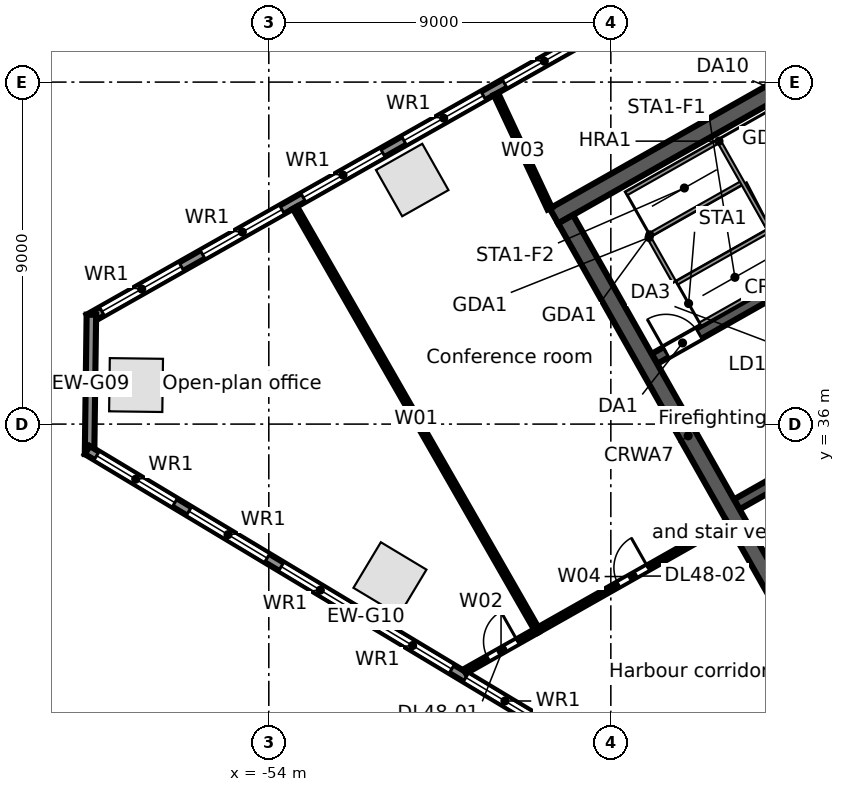
"""IFC4 building model, lengths in metres.
Left out: names, types, materials, properties, quantities, classifications, styles, units other than length and angle.
Written with IfcOpenShell. Run it as: python <this file> out.ifc"""

import sys

from ifc_helpers import new_model, si_unit, direction, frame, frame_2d, origin, origin_2d, place, context, subcontext, project, spatial, rectangle, extrude, element, fill, save


model = new_model("IFC4")
c1 = context("Model", 3, precision=1e-05, world=origin(), true_north=direction((0.0, 1.0)))
c2 = subcontext(c1, "Body", "Model", "MODEL_VIEW")
j1 = project(units=[si_unit("LENGTHUNIT", "METRE"), si_unit("PLANEANGLEUNIT", "RADIAN")], contexts=[c1])
p1 = place(None, origin())
s1 = spatial("IfcSite", under=j1, at=p1, CompositionType="ELEMENT")
p2 = place(p1, origin())
s2 = spatial("IfcBuilding", under=s1, at=p2, CompositionType="ELEMENT")
p3 = place(p2, frame((0.0, 0.0, 223.1)))
s3 = spatial("IfcBuildingStorey", under=s2, at=p3, CompositionType="ELEMENT", Elevation=223.1)
for number, where, z_axis, x_axis in (
    (1, (-50.226, 42.423, 0.0), (0.0, 0.0, 1.0), (-0.87, -0.492, 0.0)),
    (2, (-57.493, 37.027, 0.0), (0.0, 0.0, 1.0), (-0.013, -1.0, 0.0)),
    (3, (-50.812, 31.931, 0.0), (0.0, 0.0, 1.0), (0.857, -0.515, 0.0)),
):
    element("IfcColumn", number, at=place(p3, frame(where, z_axis=z_axis, x_axis=x_axis)), inside=s3, PredefinedType="COLUMN", context=c2, shape_type="SweptSolid", body=[
        extrude(rectangle(XDim=1.4, YDim=1.4, at=origin_2d()), origin(), (0.0, 0.0, 1.0), 3.9),
    ])
p4 = place(p3, frame((-58.732, 38.771, 0.0), z_axis=(0.0, 0.0, 1.0), x_axis=(0.870354824205, 0.492425100887, 0.0)))
e4 = element("IfcWall", 4, at=p4, inside=s3, PredefinedType="STANDARD", context=c2, shape_type="SweptSolid", body=[
    extrude(rectangle(XDim=64.006, YDim=0.25, at=frame_2d((32.003, 0.0))), origin(), (0.0, 0.0, 1.0), 3.62),
])
p5 = place(p4, frame((61.259, 0.0, 0.8)))
e5 = element("IfcOpeningElement", 5, at=p5, cuts=e4, PredefinedType="OPENING", context=c2, shape_type="SweptSolid", body=[
    extrude(rectangle(XDim=2.4, YDim=2.2, at=frame_2d((1.2, 1.1))), frame((0.0, 0.135, 0.0), z_axis=(0.0, -1.0, 0.0), x_axis=(1.0, 0.0, 0.0)), (0.0, 0.0, 1.0), 0.27),
])
p6 = place(p4, frame((58.216, 0.0, 0.8)))
e6 = element("IfcOpeningElement", 6, at=p6, cuts=e4, PredefinedType="OPENING", context=c2, shape_type="SweptSolid", body=[
    extrude(rectangle(XDim=2.4, YDim=2.2, at=frame_2d((1.2, 1.1))), frame((0.0, 0.135, 0.0), z_axis=(0.0, -1.0, 0.0), x_axis=(1.0, 0.0, 0.0)), (0.0, 0.0, 1.0), 0.27),
])
p7 = place(p4, frame((55.173, 0.0, 0.8)))
e7 = element("IfcOpeningElement", 7, at=p7, cuts=e4, PredefinedType="OPENING", context=c2, shape_type="SweptSolid", body=[
    extrude(rectangle(XDim=2.4, YDim=2.2, at=frame_2d((1.2, 1.1))), frame((0.0, 0.135, 0.0), z_axis=(0.0, -1.0, 0.0), x_axis=(1.0, 0.0, 0.0)), (0.0, 0.0, 1.0), 0.27),
])
p8 = place(p4, frame((52.129, 0.0, 0.8)))
e8 = element("IfcOpeningElement", 8, at=p8, cuts=e4, PredefinedType="OPENING", context=c2, shape_type="SweptSolid", body=[
    extrude(rectangle(XDim=2.4, YDim=2.2, at=frame_2d((1.2, 1.1))), frame((0.0, 0.135, 0.0), z_axis=(0.0, -1.0, 0.0), x_axis=(1.0, 0.0, 0.0)), (0.0, 0.0, 1.0), 0.27),
])
p9 = place(p4, frame((49.086, 0.0, 0.8)))
e9 = element("IfcOpeningElement", 9, at=p9, cuts=e4, PredefinedType="OPENING", context=c2, shape_type="SweptSolid", body=[
    extrude(rectangle(XDim=2.4, YDim=2.2, at=frame_2d((1.2, 1.1))), frame((0.0, 0.135, 0.0), z_axis=(0.0, -1.0, 0.0), x_axis=(1.0, 0.0, 0.0)), (0.0, 0.0, 1.0), 0.27),
])
p10 = place(p4, frame((46.043, 0.0, 0.8)))
e10 = element("IfcOpeningElement", 10, at=p10, cuts=e4, PredefinedType="OPENING", context=c2, shape_type="SweptSolid", body=[
    extrude(rectangle(XDim=2.4, YDim=2.2, at=frame_2d((1.2, 1.1))), frame((0.0, 0.135, 0.0), z_axis=(0.0, -1.0, 0.0), x_axis=(1.0, 0.0, 0.0)), (0.0, 0.0, 1.0), 0.27),
])
p11 = place(p4, frame((43.0, 0.0, 0.8)))
e11 = element("IfcOpeningElement", 11, at=p11, cuts=e4, PredefinedType="OPENING", context=c2, shape_type="SweptSolid", body=[
    extrude(rectangle(XDim=2.4, YDim=2.2, at=frame_2d((1.2, 1.1))), frame((0.0, 0.135, 0.0), z_axis=(0.0, -1.0, 0.0), x_axis=(1.0, 0.0, 0.0)), (0.0, 0.0, 1.0), 0.27),
])
p12 = place(p4, frame((39.956, 0.0, 0.8)))
e12 = element("IfcOpeningElement", 12, at=p12, cuts=e4, PredefinedType="OPENING", context=c2, shape_type="SweptSolid", body=[
    extrude(rectangle(XDim=2.4, YDim=2.2, at=frame_2d((1.2, 1.1))), frame((0.0, 0.135, 0.0), z_axis=(0.0, -1.0, 0.0), x_axis=(1.0, 0.0, 0.0)), (0.0, 0.0, 1.0), 0.27),
])
p13 = place(p4, frame((36.913, 0.0, 0.8)))
e13 = element("IfcOpeningElement", 13, at=p13, cuts=e4, PredefinedType="OPENING", context=c2, shape_type="SweptSolid", body=[
    extrude(rectangle(XDim=2.4, YDim=2.2, at=frame_2d((1.2, 1.1))), frame((0.0, 0.135, 0.0), z_axis=(0.0, -1.0, 0.0), x_axis=(1.0, 0.0, 0.0)), (0.0, 0.0, 1.0), 0.27),
])
p14 = place(p4, frame((33.87, 0.0, 0.8)))
e14 = element("IfcOpeningElement", 14, at=p14, cuts=e4, PredefinedType="OPENING", context=c2, shape_type="SweptSolid", body=[
    extrude(rectangle(XDim=2.4, YDim=2.2, at=frame_2d((1.2, 1.1))), frame((0.0, 0.135, 0.0), z_axis=(0.0, -1.0, 0.0), x_axis=(1.0, 0.0, 0.0)), (0.0, 0.0, 1.0), 0.27),
])
p15 = place(p4, frame((30.826, 0.0, 0.8)))
e15 = element("IfcOpeningElement", 15, at=p15, cuts=e4, PredefinedType="OPENING", context=c2, shape_type="SweptSolid", body=[
    extrude(rectangle(XDim=2.4, YDim=2.2, at=frame_2d((1.2, 1.1))), frame((0.0, 0.135, 0.0), z_axis=(0.0, -1.0, 0.0), x_axis=(1.0, 0.0, 0.0)), (0.0, 0.0, 1.0), 0.27),
])
p16 = place(p4, frame((27.783, 0.0, 0.8)))
e16 = element("IfcOpeningElement", 16, at=p16, cuts=e4, PredefinedType="OPENING", context=c2, shape_type="SweptSolid", body=[
    extrude(rectangle(XDim=2.4, YDim=2.2, at=frame_2d((1.2, 1.1))), frame((0.0, 0.135, 0.0), z_axis=(0.0, -1.0, 0.0), x_axis=(1.0, 0.0, 0.0)), (0.0, 0.0, 1.0), 0.27),
])
p17 = place(p4, frame((24.74, 0.0, 0.8)))
e17 = element("IfcOpeningElement", 17, at=p17, cuts=e4, PredefinedType="OPENING", context=c2, shape_type="SweptSolid", body=[
    extrude(rectangle(XDim=2.4, YDim=2.2, at=frame_2d((1.2, 1.1))), frame((0.0, 0.135, 0.0), z_axis=(0.0, -1.0, 0.0), x_axis=(1.0, 0.0, 0.0)), (0.0, 0.0, 1.0), 0.27),
])
p18 = place(p4, frame((21.696, 0.0, 0.8)))
e18 = element("IfcOpeningElement", 18, at=p18, cuts=e4, PredefinedType="OPENING", context=c2, shape_type="SweptSolid", body=[
    extrude(rectangle(XDim=2.4, YDim=2.2, at=frame_2d((1.2, 1.1))), frame((0.0, 0.135, 0.0), z_axis=(0.0, -1.0, 0.0), x_axis=(1.0, 0.0, 0.0)), (0.0, 0.0, 1.0), 0.27),
])
p19 = place(p4, frame((18.653, 0.0, 0.8)))
e19 = element("IfcOpeningElement", 19, at=p19, cuts=e4, PredefinedType="OPENING", context=c2, shape_type="SweptSolid", body=[
    extrude(rectangle(XDim=2.4, YDim=2.2, at=frame_2d((1.2, 1.1))), frame((0.0, 0.135, 0.0), z_axis=(0.0, -1.0, 0.0), x_axis=(1.0, 0.0, 0.0)), (0.0, 0.0, 1.0), 0.27),
])
p20 = place(p4, frame((15.61, 0.0, 0.8)))
e20 = element("IfcOpeningElement", 20, at=p20, cuts=e4, PredefinedType="OPENING", context=c2, shape_type="SweptSolid", body=[
    extrude(rectangle(XDim=2.4, YDim=2.2, at=frame_2d((1.2, 1.1))), frame((0.0, 0.135, 0.0), z_axis=(0.0, -1.0, 0.0), x_axis=(1.0, 0.0, 0.0)), (0.0, 0.0, 1.0), 0.27),
])
p21 = place(p4, frame((12.567, 0.0, 0.8)))
e21 = element("IfcOpeningElement", 21, at=p21, cuts=e4, PredefinedType="OPENING", context=c2, shape_type="SweptSolid", body=[
    extrude(rectangle(XDim=2.4, YDim=2.2, at=frame_2d((1.2, 1.1))), frame((0.0, 0.135, 0.0), z_axis=(0.0, -1.0, 0.0), x_axis=(1.0, 0.0, 0.0)), (0.0, 0.0, 1.0), 0.27),
])
p22 = place(p4, frame((9.523, 0.0, 0.8)))
e22 = element("IfcOpeningElement", 22, at=p22, cuts=e4, PredefinedType="OPENING", context=c2, shape_type="SweptSolid", body=[
    extrude(rectangle(XDim=2.4, YDim=2.2, at=frame_2d((1.2, 1.1))), frame((0.0, 0.135, 0.0), z_axis=(0.0, -1.0, 0.0), x_axis=(1.0, 0.0, 0.0)), (0.0, 0.0, 1.0), 0.27),
])
p23 = place(p4, frame((6.48, 0.0, 0.8)))
e23 = element("IfcOpeningElement", 23, at=p23, cuts=e4, PredefinedType="OPENING", context=c2, shape_type="SweptSolid", body=[
    extrude(rectangle(XDim=2.4, YDim=2.2, at=frame_2d((1.2, 1.1))), frame((0.0, 0.135, 0.0), z_axis=(0.0, -1.0, 0.0), x_axis=(1.0, 0.0, 0.0)), (0.0, 0.0, 1.0), 0.27),
])
p24 = place(p4, frame((3.437, 0.0, 0.8)))
e24 = element("IfcOpeningElement", 24, at=p24, cuts=e4, PredefinedType="OPENING", context=c2, shape_type="SweptSolid", body=[
    extrude(rectangle(XDim=2.4, YDim=2.2, at=frame_2d((1.2, 1.1))), frame((0.0, 0.135, 0.0), z_axis=(0.0, -1.0, 0.0), x_axis=(1.0, 0.0, 0.0)), (0.0, 0.0, 1.0), 0.27),
])
p25 = place(p4, frame((0.393, 0.0, 0.8)))
e25 = element("IfcOpeningElement", 25, at=p25, cuts=e4, PredefinedType="OPENING", context=c2, shape_type="SweptSolid", body=[
    extrude(rectangle(XDim=2.4, YDim=2.2, at=frame_2d((1.2, 1.1))), frame((0.0, 0.135, 0.0), z_axis=(0.0, -1.0, 0.0), x_axis=(1.0, 0.0, 0.0)), (0.0, 0.0, 1.0), 0.27),
])
p26 = place(p3, frame((-58.717, 35.208, 0.0), z_axis=(0.0, 0.0, 1.0), x_axis=(0.01310512158, 0.999914124207, 0.0)))
e26 = element("IfcWall", 26, at=p26, inside=s3, PredefinedType="STANDARD", context=c2, shape_type="SweptSolid", body=[
    extrude(rectangle(XDim=3.67, YDim=0.25, at=frame_2d((1.835, 0.0))), origin(), (0.0, 0.0, 1.0), 3.62),
])
p27 = place(p3, frame((-44.115, 26.507, 0.0), z_axis=(0.0, 0.0, 1.0), x_axis=(-0.857166583633, 0.515039268311, 0.0)))
e27 = element("IfcWall", 27, at=p27, inside=s3, PredefinedType="STANDARD", context=c2, shape_type="SweptSolid", body=[
    extrude(rectangle(XDim=17.106, YDim=0.25, at=frame_2d((8.553, 0.0))), origin(), (0.0, 0.0, 1.0), 3.62),
])
p28 = place(p27, frame((14.417, 0.0, 0.8)))
e28 = element("IfcOpeningElement", 28, at=p28, cuts=e27, PredefinedType="OPENING", context=c2, shape_type="SweptSolid", body=[
    extrude(rectangle(XDim=2.4, YDim=2.2, at=frame_2d((1.2, 1.1))), frame((0.0, 0.135, 0.0), z_axis=(0.0, -1.0, 0.0), x_axis=(1.0, 0.0, 0.0)), (0.0, 0.0, 1.0), 0.27),
])
p29 = place(p27, frame((11.584, 0.0, 0.8)))
e29 = element("IfcOpeningElement", 29, at=p29, cuts=e27, PredefinedType="OPENING", context=c2, shape_type="SweptSolid", body=[
    extrude(rectangle(XDim=2.4, YDim=2.2, at=frame_2d((1.2, 1.1))), frame((0.0, 0.135, 0.0), z_axis=(0.0, -1.0, 0.0), x_axis=(1.0, 0.0, 0.0)), (0.0, 0.0, 1.0), 0.27),
])
p30 = place(p27, frame((8.75, 0.0, 0.8)))
e30 = element("IfcOpeningElement", 30, at=p30, cuts=e27, PredefinedType="OPENING", context=c2, shape_type="SweptSolid", body=[
    extrude(rectangle(XDim=2.4, YDim=2.2, at=frame_2d((1.2, 1.1))), frame((0.0, 0.135, 0.0), z_axis=(0.0, -1.0, 0.0), x_axis=(1.0, 0.0, 0.0)), (0.0, 0.0, 1.0), 0.27),
])
p31 = place(p27, frame((5.917, 0.0, 0.8)))
e31 = element("IfcOpeningElement", 31, at=p31, cuts=e27, PredefinedType="OPENING", context=c2, shape_type="SweptSolid", body=[
    extrude(rectangle(XDim=2.4, YDim=2.2, at=frame_2d((1.2, 1.1))), frame((0.0, 0.135, 0.0), z_axis=(0.0, -1.0, 0.0), x_axis=(1.0, 0.0, 0.0)), (0.0, 0.0, 1.0), 0.27),
])
p32 = place(p27, frame((3.084, 0.0, 0.8)))
e32 = element("IfcOpeningElement", 32, at=p32, cuts=e27, PredefinedType="OPENING", context=c2, shape_type="SweptSolid", body=[
    extrude(rectangle(XDim=2.4, YDim=2.2, at=frame_2d((1.2, 1.1))), frame((0.0, 0.135, 0.0), z_axis=(0.0, -1.0, 0.0), x_axis=(1.0, 0.0, 0.0)), (0.0, 0.0, 1.0), 0.27),
])
p33 = place(p27, frame((0.25, 0.0, 0.8)))
e33 = element("IfcOpeningElement", 33, at=p33, cuts=e27, PredefinedType="OPENING", context=c2, shape_type="SweptSolid", body=[
    extrude(rectangle(XDim=2.4, YDim=2.2, at=frame_2d((1.2, 1.1))), frame((0.0, 0.135, 0.0), z_axis=(0.0, -1.0, 0.0), x_axis=(1.0, 0.0, 0.0)), (0.0, 0.0, 1.0), 0.27),
])
p34 = place(p3, frame((-41.687, 33.887, 0.0), z_axis=(0.0, 0.0, 1.0), x_axis=(0.870355736587, 0.49242348826, 0.0)))
e34 = element("IfcWall", 34, at=p34, inside=s3, PredefinedType="SOLIDWALL", context=c2, shape_type="SweptSolid", body=[
    extrude(rectangle(XDim=6.15, YDim=0.3, at=frame_2d((3.075, 0.0))), origin(), (0.0, 0.0, 1.0), 3.62),
])
p35 = place(p34, frame((1.25, 0.0, 0.0)))
e35 = element("IfcOpeningElement", 35, at=p35, cuts=e34, PredefinedType="OPENING", context=c2, shape_type="SweptSolid", body=[
    extrude(rectangle(XDim=1.1, YDim=2.1, at=frame_2d((0.55, 1.05))), frame((0.0, 0.16, 0.0), z_axis=(0.0, -1.0, 0.0), x_axis=(1.0, 0.0, 0.0)), (0.0, 0.0, 1.0), 0.32),
])
p36 = place(p34, frame((4.4, 0.0, 0.0)))
e36 = element("IfcOpeningElement", 36, at=p36, cuts=e34, PredefinedType="OPENING", context=c2, shape_type="SweptSolid", body=[
    extrude(rectangle(XDim=1.1, YDim=2.1, at=frame_2d((0.55, 1.05))), frame((0.0, 0.16, 0.0), z_axis=(0.0, -1.0, 0.0), x_axis=(1.0, 0.0, 0.0)), (0.0, 0.0, 1.0), 0.32),
])
p37 = place(p3, frame((-43.853, 37.717, 0.0), z_axis=(0.0, 0.0, 1.0), x_axis=(0.870360409231, 0.492415229297, 0.0)))
e37 = element("IfcWall", 37, at=p37, inside=s3, PredefinedType="SOLIDWALL", context=c2, shape_type="SweptSolid", body=[
    extrude(rectangle(XDim=7.55, YDim=0.3, at=frame_2d((3.775, 0.0))), origin(), (0.0, 0.0, 1.0), 3.62),
])
p38 = place(p37, frame((0.35, 0.0, 0.0)))
e38 = element("IfcOpeningElement", 38, at=p38, cuts=e37, PredefinedType="OPENING", context=c2, shape_type="SweptSolid", body=[
    extrude(rectangle(XDim=1.0, YDim=2.1, at=frame_2d((0.5, 1.05))), frame((0.0, 0.16, 0.0), z_axis=(0.0, -1.0, 0.0), x_axis=(1.0, 0.0, 0.0)), (0.0, 0.0, 1.0), 0.32),
])
p39 = place(p3, frame((-46.498, 41.477, 0.0), z_axis=(0.0, 0.0, 1.0), x_axis=(0.870359753402, 0.492416388494, 0.0)))
e39 = element("IfcWall", 39, at=p39, inside=s3, PredefinedType="SOLIDWALL", context=c2, shape_type="SweptSolid", body=[
    extrude(rectangle(XDim=17.0, YDim=0.45, at=frame_2d((8.5, 0.0))), origin(), (0.0, 0.0, 1.0), 3.62),
])
p40 = place(p3, frame((-46.191, 41.392, 0.0), z_axis=(0.0, 0.0, 1.0), x_axis=(0.492421378713, -0.870356930107, 0.0)))
e40 = element("IfcWall", 40, at=p40, inside=s3, PredefinedType="SOLIDWALL", context=c2, shape_type="SweptSolid", body=[
    extrude(rectangle(XDim=13.1, YDim=0.45, at=frame_2d((6.55, 0.0))), origin(), (0.0, 0.0, 1.0), 3.62),
])
p41 = place(p3, frame((-53.311, 41.695, 0.0), z_axis=(0.0, 0.0, 1.0), x_axis=(0.497344363303, -0.867553216979, 0.0)))
e41 = element("IfcWall", 41, at=p41, inside=s3, PredefinedType="PARTITIONING", context=c2, shape_type="SweptSolid", body=[
    extrude(rectangle(XDim=12.82, YDim=0.125, at=frame_2d((6.41, 0.0))), origin(), (0.0, 0.0, 1.0), 2.9),
])
p42 = place(p3, frame((-48.843, 29.494, 0.0), z_axis=(0.0, 0.0, 1.0), x_axis=(0.870427970258, 0.492295793799, 0.0)))
e42 = element("IfcWall", 42, at=p42, inside=s3, PredefinedType="PARTITIONING", context=c2, shape_type="SweptSolid", body=[
    extrude(rectangle(XDim=2.192, YDim=0.125, at=frame_2d((1.096, 0.0))), origin(), (0.0, 0.0, 1.0), 2.9),
])
p43 = place(p42, frame((0.7, 0.0, 0.0)))
e43 = element("IfcOpeningElement", 43, at=p43, cuts=e42, PredefinedType="OPENING", context=c2, shape_type="SweptSolid", body=[
    extrude(rectangle(XDim=0.9, YDim=2.1, at=frame_2d((0.45, 1.05))), frame((0.0, 0.073, 0.0), z_axis=(0.0, -1.0, 0.0), x_axis=(1.0, 0.0, 0.0)), (0.0, 0.0, 1.0), 0.145),
])
p44 = place(p3, frame((-48.022, 44.687, 0.0), z_axis=(0.0, 0.0, 1.0), x_axis=(0.424510917438, -0.905422818895, 0.0)))
e44 = element("IfcWall", 44, at=p44, inside=s3, PredefinedType="PARTITIONING", context=c2, shape_type="SweptSolid", body=[
    extrude(rectangle(XDim=3.329, YDim=0.125, at=frame_2d((1.665, 0.0))), origin(), (0.0, 0.0, 1.0), 2.988),
])
p45 = place(p3, frame((-46.935, 30.573, 0.0), z_axis=(0.0, 0.0, 1.0), x_axis=(0.870367427407, 0.492402824229, 0.0)))
e45 = element("IfcWall", 45, at=p45, inside=s3, PredefinedType="PARTITIONING", context=c2, shape_type="SweptSolid", body=[
    extrude(rectangle(XDim=5.75, YDim=0.125, at=frame_2d((2.875, 0.0))), origin(), (0.0, 0.0, 1.0), 3.62),
])
p46 = place(p45, frame((2.45, 0.0, 0.0)))
e46 = element("IfcOpeningElement", 46, at=p46, cuts=e45, PredefinedType="OPENING", context=c2, shape_type="SweptSolid", body=[
    extrude(rectangle(XDim=0.9, YDim=2.1, at=frame_2d((0.45, 1.05))), frame((0.0, 0.073, 0.0), z_axis=(0.0, -1.0, 0.0), x_axis=(1.0, 0.0, 0.0)), (0.0, 0.0, 1.0), 0.145),
])
p47 = place(p21, origin())
e47 = element("IfcWindow", 47, at=p47, inside=s3, PartitioningType="SINGLE_PANEL", PredefinedType="WINDOW", context=c2, shape_type="SweptSolid", body=[
    extrude(rectangle(XDim=2.4, YDim=2.2, at=frame_2d((1.2, 1.1))), frame((0.0, 0.03, 0.0), z_axis=(0.0, -1.0, 0.0), x_axis=(1.0, 0.0, 0.0)), (0.0, 0.0, 1.0), 0.06),
])
fill(e21, e47)
p48 = place(p22, origin())
e48 = element("IfcWindow", 48, at=p48, inside=s3, PartitioningType="SINGLE_PANEL", PredefinedType="WINDOW", context=c2, shape_type="SweptSolid", body=[
    extrude(rectangle(XDim=2.4, YDim=2.2, at=frame_2d((1.2, 1.1))), frame((0.0, 0.03, 0.0), z_axis=(0.0, -1.0, 0.0), x_axis=(1.0, 0.0, 0.0)), (0.0, 0.0, 1.0), 0.06),
])
fill(e22, e48)
p49 = place(p23, origin())
e49 = element("IfcWindow", 49, at=p49, inside=s3, PartitioningType="SINGLE_PANEL", PredefinedType="WINDOW", context=c2, shape_type="SweptSolid", body=[
    extrude(rectangle(XDim=2.4, YDim=2.2, at=frame_2d((1.2, 1.1))), frame((0.0, 0.03, 0.0), z_axis=(0.0, -1.0, 0.0), x_axis=(1.0, 0.0, 0.0)), (0.0, 0.0, 1.0), 0.06),
])
fill(e23, e49)
p50 = place(p24, origin())
e50 = element("IfcWindow", 50, at=p50, inside=s3, PartitioningType="SINGLE_PANEL", PredefinedType="WINDOW", context=c2, shape_type="SweptSolid", body=[
    extrude(rectangle(XDim=2.4, YDim=2.2, at=frame_2d((1.2, 1.1))), frame((0.0, 0.03, 0.0), z_axis=(0.0, -1.0, 0.0), x_axis=(1.0, 0.0, 0.0)), (0.0, 0.0, 1.0), 0.06),
])
fill(e24, e50)
p51 = place(p25, origin())
e51 = element("IfcWindow", 51, at=p51, inside=s3, PartitioningType="SINGLE_PANEL", PredefinedType="WINDOW", context=c2, shape_type="SweptSolid", body=[
    extrude(rectangle(XDim=2.4, YDim=2.2, at=frame_2d((1.2, 1.1))), frame((0.0, 0.03, 0.0), z_axis=(0.0, -1.0, 0.0), x_axis=(1.0, 0.0, 0.0)), (0.0, 0.0, 1.0), 0.06),
])
fill(e25, e51)
p52 = place(p28, origin())
e52 = element("IfcWindow", 52, at=p52, inside=s3, PartitioningType="SINGLE_PANEL", PredefinedType="WINDOW", context=c2, shape_type="SweptSolid", body=[
    extrude(rectangle(XDim=2.4, YDim=2.2, at=frame_2d((1.2, 1.1))), frame((0.0, 0.03, 0.0), z_axis=(0.0, -1.0, 0.0), x_axis=(1.0, 0.0, 0.0)), (0.0, 0.0, 1.0), 0.06),
])
fill(e28, e52)
p53 = place(p29, origin())
e53 = element("IfcWindow", 53, at=p53, inside=s3, PartitioningType="SINGLE_PANEL", PredefinedType="WINDOW", context=c2, shape_type="SweptSolid", body=[
    extrude(rectangle(XDim=2.4, YDim=2.2, at=frame_2d((1.2, 1.1))), frame((0.0, 0.03, 0.0), z_axis=(0.0, -1.0, 0.0), x_axis=(1.0, 0.0, 0.0)), (0.0, 0.0, 1.0), 0.06),
])
fill(e29, e53)
p54 = place(p30, origin())
e54 = element("IfcWindow", 54, at=p54, inside=s3, PartitioningType="SINGLE_PANEL", PredefinedType="WINDOW", context=c2, shape_type="SweptSolid", body=[
    extrude(rectangle(XDim=2.4, YDim=2.2, at=frame_2d((1.2, 1.1))), frame((0.0, 0.03, 0.0), z_axis=(0.0, -1.0, 0.0), x_axis=(1.0, 0.0, 0.0)), (0.0, 0.0, 1.0), 0.06),
])
fill(e30, e54)
p55 = place(p31, origin())
e55 = element("IfcWindow", 55, at=p55, inside=s3, PartitioningType="SINGLE_PANEL", PredefinedType="WINDOW", context=c2, shape_type="SweptSolid", body=[
    extrude(rectangle(XDim=2.4, YDim=2.2, at=frame_2d((1.2, 1.1))), frame((0.0, 0.03, 0.0), z_axis=(0.0, -1.0, 0.0), x_axis=(1.0, 0.0, 0.0)), (0.0, 0.0, 1.0), 0.06),
])
fill(e31, e55)
p56 = place(p32, origin())
e56 = element("IfcWindow", 56, at=p56, inside=s3, PartitioningType="SINGLE_PANEL", PredefinedType="WINDOW", context=c2, shape_type="SweptSolid", body=[
    extrude(rectangle(XDim=2.4, YDim=2.2, at=frame_2d((1.2, 1.1))), frame((0.0, 0.03, 0.0), z_axis=(0.0, -1.0, 0.0), x_axis=(1.0, 0.0, 0.0)), (0.0, 0.0, 1.0), 0.06),
])
fill(e32, e56)
p57 = place(p38, origin())
e57 = element("IfcDoor", 57, at=p57, inside=s3, OperationType="SINGLE_SWING_LEFT", PredefinedType="DOOR", context=c2, shape_type="SweptSolid", body=[
    extrude(rectangle(XDim=1.0, YDim=2.1, at=frame_2d((0.5, 1.05))), frame((0.0, 0.025, 0.0), z_axis=(0.0, -1.0, 0.0), x_axis=(1.0, 0.0, 0.0)), (0.0, 0.0, 1.0), 0.05),
])
fill(e38, e57)
p58 = place(p43, origin())
e58 = element("IfcDoor", 58, at=p58, inside=s3, OperationType="SINGLE_SWING_RIGHT", PredefinedType="DOOR", context=c2, shape_type="SweptSolid", body=[
    extrude(rectangle(XDim=0.9, YDim=2.1, at=frame_2d((0.45, 1.05))), frame((0.0, 0.025, 0.0), z_axis=(0.0, -1.0, 0.0), x_axis=(1.0, 0.0, 0.0)), (0.0, 0.0, 1.0), 0.05),
])
fill(e43, e58)
p59 = place(p46, origin())
e59 = element("IfcDoor", 59, at=p59, inside=s3, OperationType="SINGLE_SWING_RIGHT", PredefinedType="DOOR", context=c2, shape_type="SweptSolid", body=[
    extrude(rectangle(XDim=0.9, YDim=2.1, at=frame_2d((0.45, 1.05))), frame((0.0, 0.025, 0.0), z_axis=(0.0, -1.0, 0.0), x_axis=(1.0, 0.0, 0.0)), (0.0, 0.0, 1.0), 0.05),
])
fill(e46, e59)
save(model, sys.argv[1])
